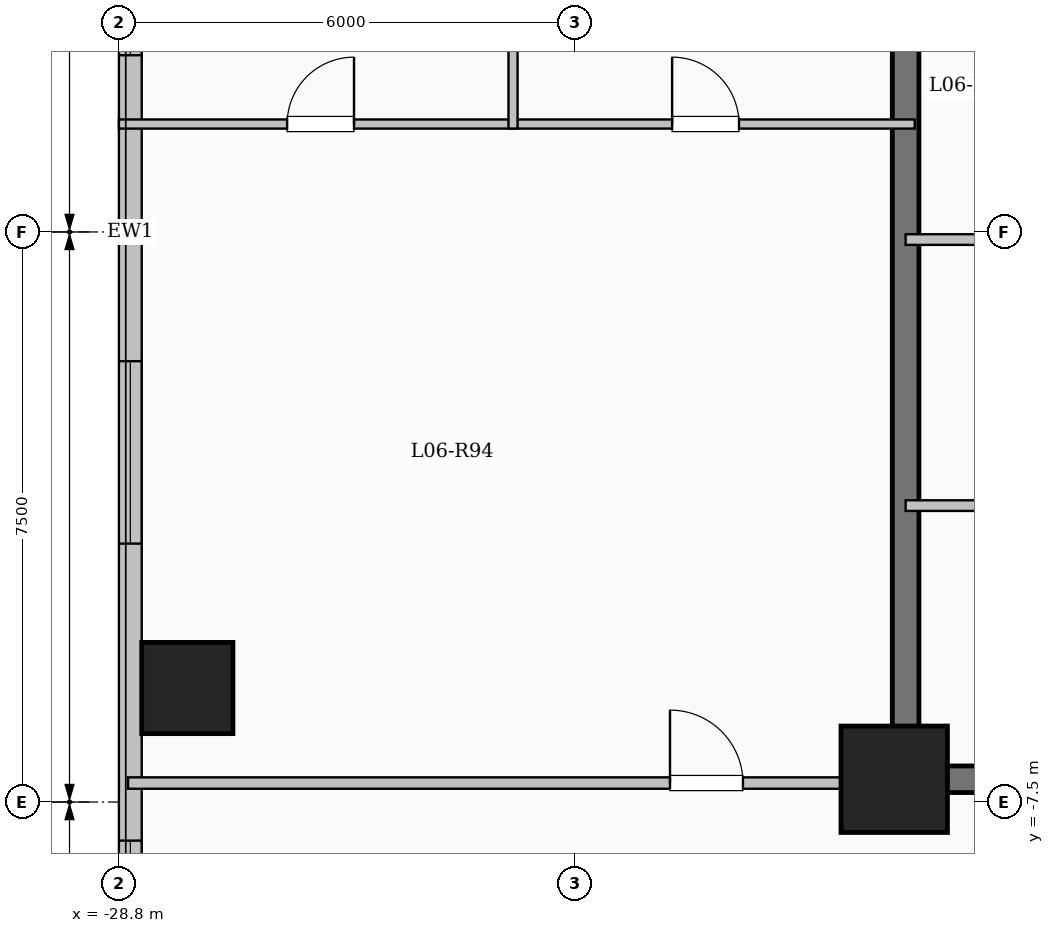
"""IFC4 building model, lengths in metres.
Left out: names, types, materials, properties, quantities, classifications, styles, units other than length and angle.
Written with IfcOpenShell. Run it as: python <this file> out.ifc"""

import sys

from ifc_helpers import new_model, si_unit, direction, frame, frame_2d, origin, origin_2d, place, context, subcontext, project, spatial, rectangle, extrude, element, fill, save


model = new_model("IFC4")
c1 = context("Model", 3, precision=1e-05, world=origin(), true_north=direction((0.0, 1.0)))
c2 = subcontext(c1, "Body", "Model", "MODEL_VIEW")
j1 = project(units=[si_unit("LENGTHUNIT", "METRE"), si_unit("PLANEANGLEUNIT", "RADIAN")], contexts=[c1])
p1 = place(None, origin())
s1 = spatial("IfcSite", under=j1, at=p1, CompositionType="ELEMENT")
p2 = place(p1, origin())
s2 = spatial("IfcBuilding", under=s1, at=p2, CompositionType="ELEMENT")
p3 = place(p2, frame((0.0, 0.0, 27.35)))
s3 = spatial("IfcBuildingStorey", under=s2, at=p3, CompositionType="ELEMENT", Elevation=27.35)
p4 = place(p3, frame((-18.6, -7.2, 0.0), z_axis=(0.0, 0.0, 1.0), x_axis=(1.0, 0.0, 0.0)))
e1 = element("IfcColumn", 1, at=p4, inside=s3, PredefinedType="COLUMN", context=c2, shape_type="SweptSolid", body=[
    extrude(rectangle(XDim=1.4, YDim=1.4, at=origin_2d()), origin(), (0.0, 0.0, 1.0), 3.35),
])
p5 = place(p3, frame((-27.9, -6.0, 0.0), z_axis=(0.0, 0.0, 1.0), x_axis=(1.0, 0.0, 0.0)))
e2 = element("IfcColumn", 2, at=p5, inside=s3, PredefinedType="COLUMN", context=c2, shape_type="SweptSolid", body=[
    extrude(rectangle(XDim=1.2, YDim=1.2, at=origin_2d()), origin(), (0.0, 0.0, 1.0), 3.35),
])
p6 = place(p3, frame((-28.65, -19.05, 0.0), z_axis=(0.0, 0.0, 1.0), x_axis=(0.0, 1.0, 0.0)))
e3 = element("IfcWall", 3, at=p6, inside=s3, PredefinedType="SOLIDWALL", context=c2, shape_type="SweptSolid", body=[
    extrude(rectangle(XDim=38.1, YDim=0.3, at=frame_2d((19.05, 0.0))), origin(), (0.0, 0.0, 1.0), 3.1),
])
p7 = place(p6, frame((3.15, 0.0, 0.9)))
e4 = element("IfcOpeningElement", 4, at=p7, cuts=e3, PredefinedType="OPENING", context=c2, shape_type="SweptSolid", body=[
    extrude(rectangle(XDim=2.4, YDim=1.8, at=frame_2d((1.2, 0.9))), frame((0.0, 0.16, 0.0), z_axis=(0.0, -1.0, 0.0), x_axis=(1.0, 0.0, 0.0)), (0.0, 0.0, 1.0), 0.32),
])
p8 = place(p6, frame((9.542, 0.0, 0.9)))
e5 = element("IfcOpeningElement", 5, at=p8, cuts=e3, PredefinedType="OPENING", context=c2, shape_type="SweptSolid", body=[
    extrude(rectangle(XDim=1.5, YDim=1.65, at=frame_2d((0.75, 0.825))), frame((0.0, 0.16, 0.0), z_axis=(0.0, -1.0, 0.0), x_axis=(1.0, 0.0, 0.0)), (0.0, 0.0, 1.0), 0.32),
])
p9 = place(p6, frame((14.95, 0.0, 0.9)))
e6 = element("IfcOpeningElement", 6, at=p9, cuts=e3, PredefinedType="OPENING", context=c2, shape_type="SweptSolid", body=[
    extrude(rectangle(XDim=2.4, YDim=1.8, at=frame_2d((1.2, 0.9))), frame((0.0, 0.16, 0.0), z_axis=(0.0, -1.0, 0.0), x_axis=(1.0, 0.0, 0.0)), (0.0, 0.0, 1.0), 0.32),
])
p10 = place(p6, frame((21.375, 0.0, 0.9)))
e7 = element("IfcOpeningElement", 7, at=p10, cuts=e3, PredefinedType="OPENING", context=c2, shape_type="SweptSolid", body=[
    extrude(rectangle(XDim=1.8, YDim=1.65, at=frame_2d((0.9, 0.825))), frame((0.0, 0.16, 0.0), z_axis=(0.0, -1.0, 0.0), x_axis=(1.0, 0.0, 0.0)), (0.0, 0.0, 1.0), 0.32),
])
p11 = place(p6, frame((25.925, 0.0, 0.9)))
e8 = element("IfcOpeningElement", 8, at=p11, cuts=e3, PredefinedType="OPENING", context=c2, shape_type="SweptSolid", body=[
    extrude(rectangle(XDim=2.0, YDim=1.7, at=frame_2d((1.0, 0.85))), frame((0.0, 0.16, 0.0), z_axis=(0.0, -1.0, 0.0), x_axis=(1.0, 0.0, 0.0)), (0.0, 0.0, 1.0), 0.32),
])
p12 = place(p6, frame((30.175, 0.0, 0.95)))
e9 = element("IfcOpeningElement", 9, at=p12, cuts=e3, PredefinedType="OPENING", context=c2, shape_type="SweptSolid", body=[
    extrude(rectangle(XDim=1.0, YDim=1.5, at=frame_2d((0.5, 0.75))), frame((0.0, 0.16, 0.0), z_axis=(0.0, -1.0, 0.0), x_axis=(1.0, 0.0, 0.0)), (0.0, 0.0, 1.0), 0.32),
])
p13 = place(p6, frame((33.85, 0.0, 0.9)))
e10 = element("IfcOpeningElement", 10, at=p13, cuts=e3, PredefinedType="OPENING", context=c2, shape_type="SweptSolid", body=[
    extrude(rectangle(XDim=2.0, YDim=1.7, at=frame_2d((1.0, 0.85))), frame((0.0, 0.16, 0.0), z_axis=(0.0, -1.0, 0.0), x_axis=(1.0, 0.0, 0.0)), (0.0, 0.0, 1.0), 0.32),
])
p14 = place(p3, frame((-18.45, -7.375, 0.0), z_axis=(0.0, 0.0, 1.0), x_axis=(0.0, 1.0, 0.0)))
e11 = element("IfcWall", 11, at=p14, inside=s3, PredefinedType="SHEAR", context=c2, shape_type="SweptSolid", body=[
    extrude(rectangle(XDim=14.05, YDim=0.35, at=frame_2d((7.025, 0.0))), origin(), (0.0, 0.0, 1.0), 3.35),
])
p15 = place(p3, frame((-18.625, -7.2, 0.0), z_axis=(0.0, 0.0, 1.0), x_axis=(1.0, 0.0, 0.0)))
e12 = element("IfcWall", 12, at=p15, inside=s3, PredefinedType="SHEAR", context=c2, shape_type="SweptSolid", body=[
    extrude(rectangle(XDim=8.55, YDim=0.35, at=frame_2d((4.275, 0.0))), origin(), (0.0, 0.0, 1.0), 3.35),
])
p16 = place(p3, frame((-18.45, -3.6, 0.0), z_axis=(0.0, 0.0, 1.0), x_axis=(1.0, 0.0, 0.0)))
e13 = element("IfcWall", 13, at=p16, inside=s3, PredefinedType="PARTITIONING", context=c2, shape_type="SweptSolid", body=[
    extrude(rectangle(XDim=3.05, YDim=0.14, at=frame_2d((1.525, 0.0))), origin(), (0.0, 0.0, 1.0), 3.1),
])
p17 = place(p16, frame((1.05, 0.0, 0.0)))
e14 = element("IfcOpeningElement", 14, at=p17, cuts=e13, PredefinedType="OPENING", context=c2, shape_type="SweptSolid", body=[
    extrude(rectangle(XDim=0.9, YDim=2.08, at=frame_2d((0.45, 1.04))), frame((0.0, 0.08, 0.0), z_axis=(0.0, -1.0, 0.0), x_axis=(1.0, 0.0, 0.0)), (0.0, 0.0, 1.0), 0.16),
])
p18 = place(p3, frame((-18.45, -0.1, 0.0), z_axis=(0.0, 0.0, 1.0), x_axis=(1.0, 0.0, 0.0)))
e15 = element("IfcWall", 15, at=p18, inside=s3, PredefinedType="PARTITIONING", context=c2, shape_type="SweptSolid", body=[
    extrude(rectangle(XDim=3.05, YDim=0.14, at=frame_2d((1.525, 0.0))), origin(), (0.0, 0.0, 1.0), 3.1),
])
p19 = place(p18, frame((1.05, 0.0, 0.0)))
e16 = element("IfcOpeningElement", 16, at=p19, cuts=e15, PredefinedType="OPENING", context=c2, shape_type="SweptSolid", body=[
    extrude(rectangle(XDim=0.9, YDim=2.08, at=frame_2d((0.45, 1.04))), frame((0.0, 0.08, 0.0), z_axis=(0.0, -1.0, 0.0), x_axis=(1.0, 0.0, 0.0)), (0.0, 0.0, 1.0), 0.16),
])
p20 = place(p3, frame((-28.68, -7.25, 0.0), z_axis=(0.0, 0.0, 1.0), x_axis=(1.0, 0.0, 0.0)))
e17 = element("IfcWall", 17, at=p20, inside=s3, PredefinedType="PARTITIONING", context=c2, shape_type="SweptSolid", body=[
    extrude(rectangle(XDim=10.23, YDim=0.15, at=frame_2d((5.115, 0.0))), origin(), (0.0, 0.0, 1.0), 3.1),
])
p21 = place(p20, frame((7.13, 0.0, 0.0)))
e18 = element("IfcOpeningElement", 18, at=p21, cuts=e17, PredefinedType="OPENING", context=c2, shape_type="SweptSolid", body=[
    extrude(rectangle(XDim=0.96, YDim=2.15, at=frame_2d((0.48, 1.075))), frame((0.0, 0.085, 0.0), z_axis=(0.0, -1.0, 0.0), x_axis=(1.0, 0.0, 0.0)), (0.0, 0.0, 1.0), 0.17),
])
p22 = place(p3, frame((-28.8, 1.42, 0.0), z_axis=(0.0, 0.0, 1.0), x_axis=(1.0, 0.0, 0.0)))
e19 = element("IfcWall", 19, at=p22, inside=s3, PredefinedType="PARTITIONING", context=c2, shape_type="SweptSolid", body=[
    extrude(rectangle(XDim=10.47, YDim=0.12, at=frame_2d((5.235, 0.0))), origin(), (0.0, 0.0, 1.0), 3.1),
])
p23 = place(p22, frame((2.213, 0.0, 0.0)))
e20 = element("IfcOpeningElement", 20, at=p23, cuts=e19, PredefinedType="OPENING", context=c2, shape_type="SweptSolid", body=[
    extrude(rectangle(XDim=0.88, YDim=2.1, at=frame_2d((0.44, 1.05))), frame((0.0, 0.07, 0.0), z_axis=(0.0, -1.0, 0.0), x_axis=(1.0, 0.0, 0.0)), (0.0, 0.0, 1.0), 0.14),
])
p24 = place(p22, frame((7.278, 0.0, 0.0)))
e21 = element("IfcOpeningElement", 21, at=p24, cuts=e19, PredefinedType="OPENING", context=c2, shape_type="SweptSolid", body=[
    extrude(rectangle(XDim=0.88, YDim=2.1, at=frame_2d((0.44, 1.05))), frame((0.0, 0.07, 0.0), z_axis=(0.0, -1.0, 0.0), x_axis=(1.0, 0.0, 0.0)), (0.0, 0.0, 1.0), 0.14),
])
p25 = place(p3, frame((-23.615, 1.36, 0.0), z_axis=(0.0, 0.0, 1.0), x_axis=(0.0, 1.0, 0.0)))
e22 = element("IfcWall", 22, at=p25, inside=s3, PredefinedType="PARTITIONING", context=c2, shape_type="SweptSolid", body=[
    extrude(rectangle(XDim=3.58, YDim=0.12, at=frame_2d((1.79, 0.0))), origin(), (0.0, 0.0, 1.0), 3.1),
])
p26 = place(p8, origin())
e23 = element("IfcWindow", 23, at=p26, inside=s3, PartitioningType="SINGLE_PANEL", PredefinedType="WINDOW", context=c2, shape_type="SweptSolid", body=[
    extrude(rectangle(XDim=1.5, YDim=1.65, at=frame_2d((0.75, 0.825))), frame((0.0, 0.03, 0.0), z_axis=(0.0, -1.0, 0.0), x_axis=(1.0, 0.0, 0.0)), (0.0, 0.0, 1.0), 0.06),
])
fill(e5, e23)
p27 = place(p9, origin())
e24 = element("IfcWindow", 24, at=p27, inside=s3, PartitioningType="SINGLE_PANEL", PredefinedType="WINDOW", context=c2, shape_type="SweptSolid", body=[
    extrude(rectangle(XDim=2.4, YDim=1.8, at=frame_2d((1.2, 0.9))), frame((0.0, 0.03, 0.0), z_axis=(0.0, -1.0, 0.0), x_axis=(1.0, 0.0, 0.0)), (0.0, 0.0, 1.0), 0.06),
])
fill(e6, e24)
p28 = place(p10, origin())
e25 = element("IfcWindow", 25, at=p28, inside=s3, PartitioningType="SINGLE_PANEL", PredefinedType="WINDOW", context=c2, shape_type="SweptSolid", body=[
    extrude(rectangle(XDim=1.8, YDim=1.65, at=frame_2d((0.9, 0.825))), frame((0.0, 0.03, 0.0), z_axis=(0.0, -1.0, 0.0), x_axis=(1.0, 0.0, 0.0)), (0.0, 0.0, 1.0), 0.06),
])
fill(e7, e25)
p29 = place(p21, origin())
e26 = element("IfcDoor", 26, at=p29, inside=s3, OperationType="SINGLE_SWING_LEFT", PredefinedType="DOOR", context=c2, shape_type="SweptSolid", body=[
    extrude(rectangle(XDim=0.96, YDim=2.15, at=frame_2d((0.48, 1.075))), frame((0.0, 0.025, 0.0), z_axis=(0.0, -1.0, 0.0), x_axis=(1.0, 0.0, 0.0)), (0.0, 0.0, 1.0), 0.05),
])
fill(e18, e26)
p30 = place(p23, origin())
e27 = element("IfcDoor", 27, at=p30, inside=s3, OperationType="SINGLE_SWING_RIGHT", PredefinedType="DOOR", context=c2, shape_type="SweptSolid", body=[
    extrude(rectangle(XDim=0.88, YDim=2.1, at=frame_2d((0.44, 1.05))), frame((0.0, 0.025, 0.0), z_axis=(0.0, -1.0, 0.0), x_axis=(1.0, 0.0, 0.0)), (0.0, 0.0, 1.0), 0.05),
])
fill(e20, e27)
p31 = place(p24, origin())
e28 = element("IfcDoor", 28, at=p31, inside=s3, OperationType="SINGLE_SWING_LEFT", PredefinedType="DOOR", context=c2, shape_type="SweptSolid", body=[
    extrude(rectangle(XDim=0.88, YDim=2.1, at=frame_2d((0.44, 1.05))), frame((0.0, 0.025, 0.0), z_axis=(0.0, -1.0, 0.0), x_axis=(1.0, 0.0, 0.0)), (0.0, 0.0, 1.0), 0.05),
])
fill(e21, e28)
save(model, sys.argv[1])
